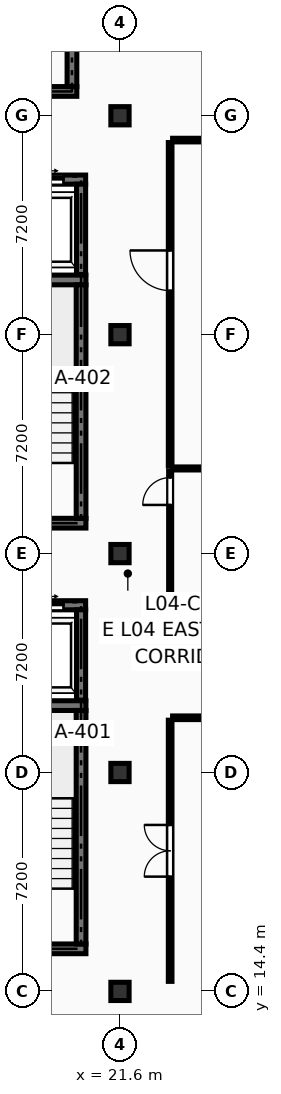
"""IFC4 building model, lengths in metres.
Left out: names, types, materials, properties, quantities, classifications, styles, units other than length and angle.
Written with IfcOpenShell. Run it as: python <this file> out.ifc"""

import sys

from ifc_helpers import new_model, si_unit, direction, frame, frame_2d, origin, origin_2d, place, context, subcontext, project, spatial, rectangle, extrude, element, fill, save


model = new_model("IFC4")
c1 = context("Model", 3, precision=1e-05, world=origin(), true_north=direction((0.0, 1.0)))
c2 = subcontext(c1, "Body", "Model", "MODEL_VIEW")
j1 = project(units=[si_unit("LENGTHUNIT", "METRE"), si_unit("PLANEANGLEUNIT", "RADIAN")], contexts=[c1])
p1 = place(None, origin())
s1 = spatial("IfcSite", under=j1, at=p1, CompositionType="ELEMENT")
p2 = place(p1, origin())
s2 = spatial("IfcBuilding", under=s1, at=p2, CompositionType="ELEMENT")
p3 = place(p2, frame((0.0, 0.0, 15.75)))
s3 = spatial("IfcBuildingStorey", under=s2, at=p3, CompositionType="ELEMENT", Elevation=15.75)
for number, where, z_axis, x_axis in (
    (1, (21.6, 14.4, 0.0), (0.0, 0.0, 1.0), (1.0, 0.0, 0.0)),
    (2, (21.6, 21.6, 0.0), (0.0, 0.0, 1.0), (1.0, 0.0, 0.0)),
    (3, (21.6, 28.8, 0.0), (0.0, 0.0, 1.0), (1.0, 0.0, 0.0)),
    (4, (21.6, 36.0, 0.0), (0.0, 0.0, 1.0), (1.0, 0.0, 0.0)),
    (5, (21.6, 43.2, 0.0), (0.0, 0.0, 1.0), (1.0, 0.0, 0.0)),
):
    element("IfcColumn", number, at=place(p3, frame(where, z_axis=z_axis, x_axis=x_axis)), inside=s3, PredefinedType="COLUMN", context=c2, shape_type="SweptSolid", body=[
        extrude(rectangle(XDim=0.6, YDim=0.6, at=origin_2d()), origin(), (0.0, 0.0, 1.0), 3.6),
    ])
for number, where, z_axis, x_axis in (
    (6, (15.64, 15.8, 0.0), (0.0, 0.0, 1.0), (1.0, 0.0, 0.0)),
    (7, (15.64, 23.8, 0.0), (0.0, 0.0, 1.0), (1.0, 0.0, 0.0)),
):
    element("IfcWall", number, at=place(p3, frame(where, z_axis=z_axis, x_axis=x_axis)), inside=s3, PredefinedType="SHEAR", context=c2, shape_type="SweptSolid", body=[
        extrude(rectangle(XDim=4.84, YDim=0.32, at=frame_2d((2.42, 0.0))), origin(), (0.0, 0.0, 1.0), 3.39),
    ])
p4 = place(p3, frame((20.32, 15.96, 0.0), z_axis=(0.0, 0.0, 1.0), x_axis=(0.0, 1.0, 0.0)))
e8 = element("IfcWall", 8, at=p4, inside=s3, PredefinedType="SHEAR", context=c2, shape_type="SweptSolid", body=[
    extrude(rectangle(XDim=7.68, YDim=0.32, at=frame_2d((3.84, 0.0))), origin(), (0.0, 0.0, 1.0), 3.39),
])
for number, where, z_axis, x_axis in (
    (9, (15.64, 29.8, 0.0), (0.0, 0.0, 1.0), (1.0, 0.0, 0.0)),
    (10, (15.64, 37.8, 0.0), (0.0, 0.0, 1.0), (1.0, 0.0, 0.0)),
):
    element("IfcWall", number, at=place(p3, frame(where, z_axis=z_axis, x_axis=x_axis)), inside=s3, PredefinedType="SHEAR", context=c2, shape_type="SweptSolid", body=[
        extrude(rectangle(XDim=4.84, YDim=0.32, at=frame_2d((2.42, 0.0))), origin(), (0.0, 0.0, 1.0), 3.39),
    ])
p5 = place(p3, frame((20.32, 29.96, 0.0), z_axis=(0.0, 0.0, 1.0), x_axis=(0.0, 1.0, 0.0)))
e11 = element("IfcWall", 11, at=p5, inside=s3, PredefinedType="SHEAR", context=c2, shape_type="SweptSolid", body=[
    extrude(rectangle(XDim=7.68, YDim=0.32, at=frame_2d((3.84, 0.0))), origin(), (0.0, 0.0, 1.0), 3.39),
])
p6 = place(p3, frame((15.74, 44.0, 0.0), z_axis=(0.0, 0.0, 1.0), x_axis=(1.0, 0.0, 0.0)))
e12 = element("IfcWall", 12, at=p6, inside=s3, PredefinedType="SHEAR", context=c2, shape_type="SweptSolid", body=[
    extrude(rectangle(XDim=4.44, YDim=0.32, at=frame_2d((2.22, 0.0))), origin(), (0.0, 0.0, 1.0), 3.39),
])
p7 = place(p3, frame((20.02, 44.16, 0.0), z_axis=(0.0, 0.0, 1.0), x_axis=(0.0, 1.0, 0.0)))
e13 = element("IfcWall", 13, at=p7, inside=s3, PredefinedType="SHEAR", context=c2, shape_type="SweptSolid", body=[
    extrude(rectangle(XDim=7.28, YDim=0.32, at=frame_2d((3.64, 0.0))), origin(), (0.0, 0.0, 1.0), 3.39),
])
p8 = place(p3, frame((17.91, 27.1, 0.0), z_axis=(0.0, 0.0, 1.0), x_axis=(1.0, 0.0, 0.0)))
e14 = element("IfcWall", 14, at=p8, inside=s3, PredefinedType="SHEAR", context=c2, shape_type="SweptSolid", body=[
    extrude(rectangle(XDim=2.56, YDim=0.3, at=frame_2d((1.28, 0.0))), origin(), (0.0, 0.0, 1.0), 3.39),
])
p9 = place(p8, frame((0.73, 0.0, 0.0)))
e15 = element("IfcOpeningElement", 15, at=p9, cuts=e14, PredefinedType="OPENING", context=c2, shape_type="SweptSolid", body=[
    extrude(rectangle(XDim=1.1, YDim=2.2, at=frame_2d((0.55, 1.1))), frame((0.0, 0.162, 0.0), z_axis=(0.0, -1.0, 0.0), x_axis=(1.0, 0.0, 0.0)), (0.0, 0.0, 1.0), 0.324),
])
p10 = place(p3, frame((20.32, 23.98, 0.0), z_axis=(0.0, 0.0, 1.0), x_axis=(0.0, 1.0, 0.0)))
e16 = element("IfcWall", 16, at=p10, inside=s3, PredefinedType="SHEAR", context=c2, shape_type="SweptSolid", body=[
    extrude(rectangle(XDim=2.97, YDim=0.3, at=frame_2d((1.485, 0.0))), origin(), (0.0, 0.0, 1.0), 3.39),
])
p11 = place(p3, frame((17.91, 41.1, 0.0), z_axis=(0.0, 0.0, 1.0), x_axis=(1.0, 0.0, 0.0)))
e17 = element("IfcWall", 17, at=p11, inside=s3, PredefinedType="SHEAR", context=c2, shape_type="SweptSolid", body=[
    extrude(rectangle(XDim=2.56, YDim=0.3, at=frame_2d((1.28, 0.0))), origin(), (0.0, 0.0, 1.0), 3.39),
])
p12 = place(p11, frame((0.73, 0.0, 0.0)))
e18 = element("IfcOpeningElement", 18, at=p12, cuts=e17, PredefinedType="OPENING", context=c2, shape_type="SweptSolid", body=[
    extrude(rectangle(XDim=1.1, YDim=2.2, at=frame_2d((0.55, 1.1))), frame((0.0, 0.162, 0.0), z_axis=(0.0, -1.0, 0.0), x_axis=(1.0, 0.0, 0.0)), (0.0, 0.0, 1.0), 0.324),
])
p13 = place(p3, frame((20.32, 37.98, 0.0), z_axis=(0.0, 0.0, 1.0), x_axis=(0.0, 1.0, 0.0)))
e19 = element("IfcWall", 19, at=p13, inside=s3, PredefinedType="SHEAR", context=c2, shape_type="SweptSolid", body=[
    extrude(rectangle(XDim=2.97, YDim=0.3, at=frame_2d((1.485, 0.0))), origin(), (0.0, 0.0, 1.0), 3.39),
])
p14 = place(p3, frame((23.25, 14.73, 0.0), z_axis=(0.0, 0.0, 1.0), x_axis=(0.0, 1.0, 0.0)))
e20 = element("IfcWall", 20, at=p14, inside=s3, PredefinedType="PARTITIONING", context=c2, shape_type="SweptSolid", body=[
    extrude(rectangle(XDim=8.59, YDim=0.12, at=frame_2d((4.295, 0.0))), origin(), (0.0, 0.0, 1.0), 3.375),
])
p15 = place(p14, frame((3.445, 0.0, 0.0)))
e21 = element("IfcOpeningElement", 21, at=p15, cuts=e20, PredefinedType="OPENING", context=c2, shape_type="SweptSolid", body=[
    extrude(rectangle(XDim=1.7, YDim=2.28, at=frame_2d((0.85, 1.14))), frame((0.0, 0.072, 0.0), z_axis=(0.0, -1.0, 0.0), x_axis=(1.0, 0.0, 0.0)), (0.0, 0.0, 1.0), 0.144),
])
p16 = place(p3, frame((23.33, 23.4, 0.0), z_axis=(0.0, 0.0, 1.0), x_axis=(1.0, 0.0, 0.0)))
e22 = element("IfcWall", 22, at=p16, inside=s3, PredefinedType="PARTITIONING", context=c2, shape_type="SweptSolid", body=[
    extrude(rectangle(XDim=5.09, YDim=0.12, at=frame_2d((2.545, 0.0))), origin(), (0.0, 0.0, 1.0), 3.375),
])
p17 = place(p3, frame((23.25, 27.28, 0.0), z_axis=(0.0, 0.0, 1.0), x_axis=(0.0, 1.0, 0.0)))
e23 = element("IfcWall", 23, at=p17, inside=s3, PredefinedType="PARTITIONING", context=c2, shape_type="SweptSolid", body=[
    extrude(rectangle(XDim=4.24, YDim=0.1, at=frame_2d((2.12, 0.0))), origin(), (0.0, 0.0, 1.0), 3.375),
])
p18 = place(p17, frame((3.12, 0.0, 0.0)))
e24 = element("IfcOpeningElement", 24, at=p18, cuts=e23, PredefinedType="OPENING", context=c2, shape_type="SweptSolid", body=[
    extrude(rectangle(XDim=0.9, YDim=2.1, at=frame_2d((0.45, 1.05))), frame((0.0, 0.062, 0.0), z_axis=(0.0, -1.0, 0.0), x_axis=(1.0, 0.0, 0.0)), (0.0, 0.0, 1.0), 0.124),
])
for number, where, z_axis, x_axis in (
    (25, (23.33, 27.2, 0.0), (0.0, 0.0, 1.0), (1.0, 0.0, 0.0)),
    (26, (23.33, 31.6, 0.0), (0.0, 0.0, 1.0), (1.0, 0.0, 0.0)),
):
    element("IfcWall", number, at=place(p3, frame(where, z_axis=z_axis, x_axis=x_axis)), inside=s3, PredefinedType="PARTITIONING", context=c2, shape_type="SweptSolid", body=[
        extrude(rectangle(XDim=5.09, YDim=0.1, at=frame_2d((2.545, 0.0))), origin(), (0.0, 0.0, 1.0), 3.375),
    ])
p19 = place(p3, frame((23.25, 31.68, 0.0), z_axis=(0.0, 0.0, 1.0), x_axis=(0.0, 1.0, 0.0)))
e27 = element("IfcWall", 27, at=p19, inside=s3, PredefinedType="PARTITIONING", context=c2, shape_type="SweptSolid", body=[
    extrude(rectangle(XDim=10.64, YDim=0.12, at=frame_2d((5.32, 0.0))), origin(), (0.0, 0.0, 1.0), 3.375),
])
p20 = place(p19, frame((5.77, 0.0, 0.0)))
e28 = element("IfcOpeningElement", 28, at=p20, cuts=e27, PredefinedType="OPENING", context=c2, shape_type="SweptSolid", body=[
    extrude(rectangle(XDim=1.32, YDim=2.2, at=frame_2d((0.66, 1.1))), frame((0.0, 0.072, 0.0), z_axis=(0.0, -1.0, 0.0), x_axis=(1.0, 0.0, 0.0)), (0.0, 0.0, 1.0), 0.144),
])
p21 = place(p3, frame((23.33, 42.4, 0.0), z_axis=(0.0, 0.0, 1.0), x_axis=(1.0, 0.0, 0.0)))
e29 = element("IfcWall", 29, at=p21, inside=s3, PredefinedType="PARTITIONING", context=c2, shape_type="SweptSolid", body=[
    extrude(rectangle(XDim=9.69, YDim=0.12, at=frame_2d((4.845, 0.0))), origin(), (0.0, 0.0, 1.0), 3.375),
])
p22 = place(p9, origin())
e30 = element("IfcDoor", 30, at=p22, inside=s3, OperationType="DOUBLE_DOOR_SLIDING", PredefinedType="DOOR", context=c2, shape_type="SweptSolid", body=[
    extrude(rectangle(XDim=1.1, YDim=2.2, at=frame_2d((0.55, 1.1))), frame((0.0, 0.025, 0.0), z_axis=(0.0, -1.0, 0.0), x_axis=(1.0, 0.0, 0.0)), (0.0, 0.0, 1.0), 0.05),
])
fill(e15, e30)
p23 = place(p12, origin())
e31 = element("IfcDoor", 31, at=p23, inside=s3, OperationType="DOUBLE_DOOR_SLIDING", PredefinedType="DOOR", context=c2, shape_type="SweptSolid", body=[
    extrude(rectangle(XDim=1.1, YDim=2.2, at=frame_2d((0.55, 1.1))), frame((0.0, 0.025, 0.0), z_axis=(0.0, -1.0, 0.0), x_axis=(1.0, 0.0, 0.0)), (0.0, 0.0, 1.0), 0.05),
])
fill(e18, e31)
p24 = place(p15, origin())
e32 = element("IfcDoor", 32, at=p24, inside=s3, OperationType="DOUBLE_DOOR_SINGLE_SWING", PredefinedType="DOOR", context=c2, shape_type="SweptSolid", body=[
    extrude(rectangle(XDim=1.7, YDim=2.28, at=frame_2d((0.85, 1.14))), frame((0.0, 0.025, 0.0), z_axis=(0.0, -1.0, 0.0), x_axis=(1.0, 0.0, 0.0)), (0.0, 0.0, 1.0), 0.05),
])
fill(e21, e32)
p25 = place(p18, origin())
e33 = element("IfcDoor", 33, at=p25, inside=s3, OperationType="SINGLE_SWING_LEFT", PredefinedType="DOOR", context=c2, shape_type="SweptSolid", body=[
    extrude(rectangle(XDim=0.9, YDim=2.1, at=frame_2d((0.45, 1.05))), frame((0.0, 0.025, 0.0), z_axis=(0.0, -1.0, 0.0), x_axis=(1.0, 0.0, 0.0)), (0.0, 0.0, 1.0), 0.05),
])
fill(e24, e33)
p26 = place(p20, origin())
e34 = element("IfcDoor", 34, at=p26, inside=s3, OperationType="SINGLE_SWING_RIGHT", PredefinedType="DOOR", context=c2, shape_type="SweptSolid", body=[
    extrude(rectangle(XDim=1.32, YDim=2.2, at=frame_2d((0.66, 1.1))), frame((0.0, 0.025, 0.0), z_axis=(0.0, -1.0, 0.0), x_axis=(1.0, 0.0, 0.0)), (0.0, 0.0, 1.0), 0.05),
])
fill(e28, e34)
save(model, sys.argv[1])
